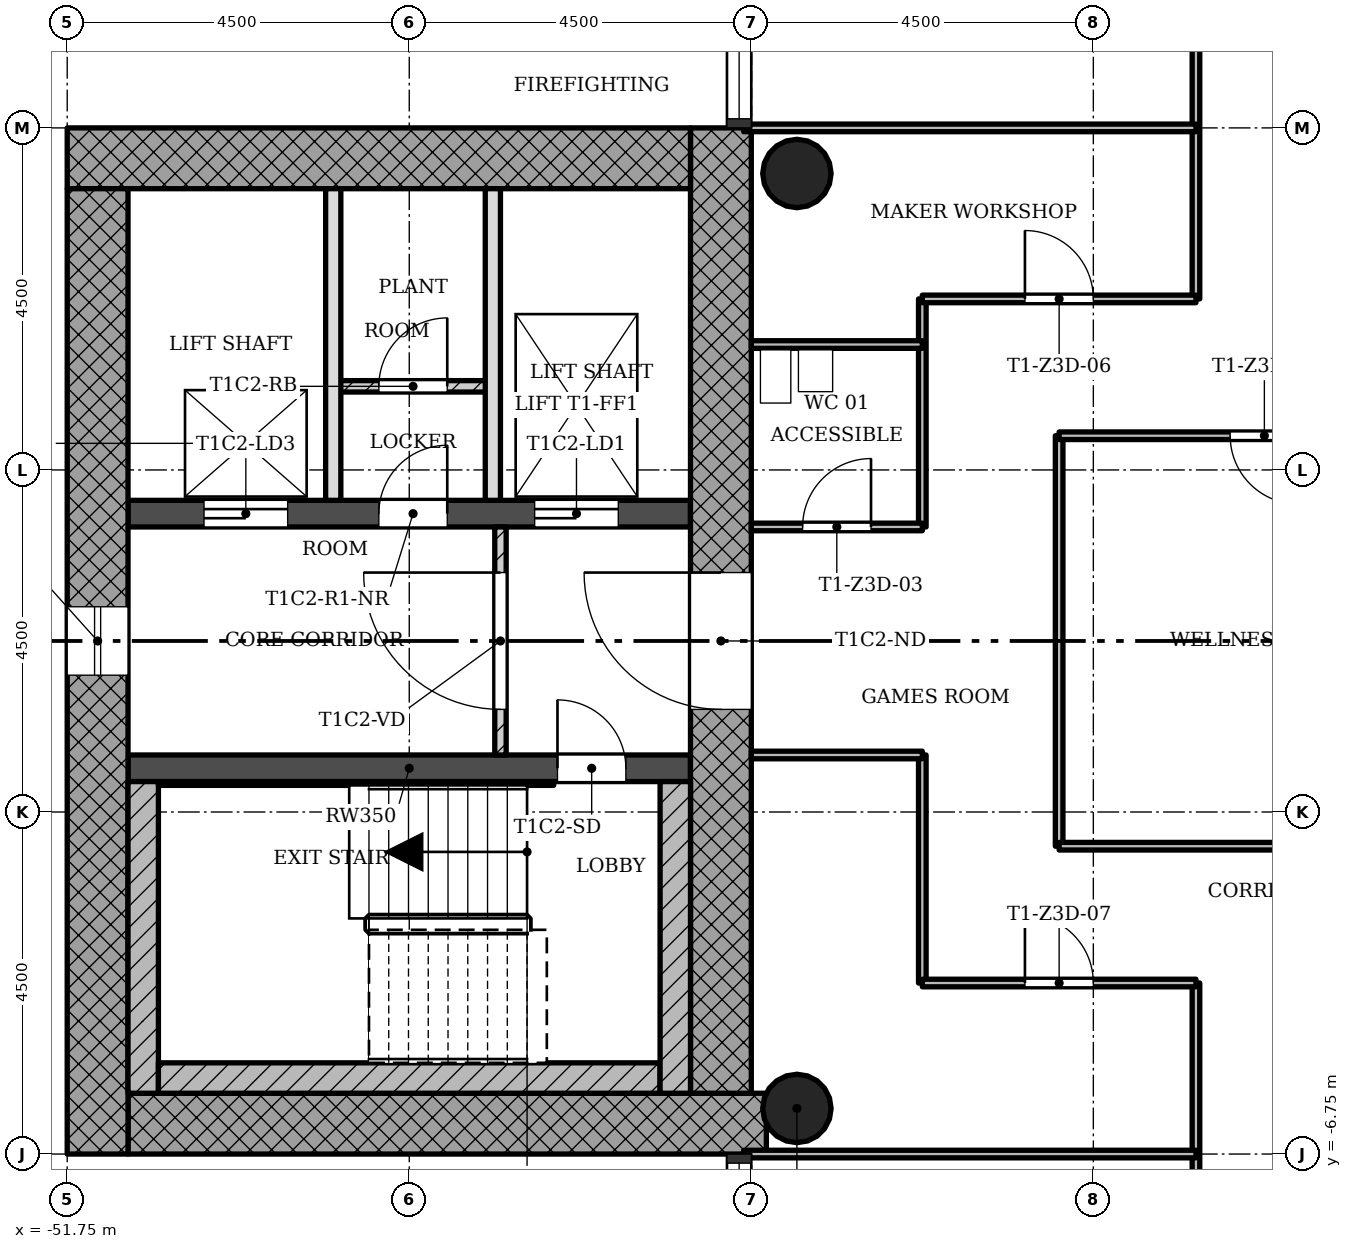
"""IFC4 building model, lengths in metres.
Left out: names, types, materials, properties, quantities, classifications, styles, units other than length and angle.
Written with IfcOpenShell. Run it as: python <this file> out.ifc"""

import sys

from ifc_helpers import new_model, si_unit, direction, frame, frame_2d, origin, origin_2d, place, context, subcontext, project, spatial, rectangle, hollow_circle, extrude, element, fill, save


model = new_model("IFC4")
c1 = context("Model", 3, precision=1e-05, world=origin(), true_north=direction((0.0, 1.0)))
c2 = subcontext(c1, "Body", "Model", "MODEL_VIEW")
j1 = project(units=[si_unit("LENGTHUNIT", "METRE"), si_unit("PLANEANGLEUNIT", "RADIAN")], contexts=[c1])
p1 = place(None, origin())
s1 = spatial("IfcSite", under=j1, at=p1, CompositionType="ELEMENT")
p2 = place(p1, origin())
s2 = spatial("IfcBuilding", under=s1, at=p2, CompositionType="ELEMENT")
p3 = place(p2, frame((0.0, 0.0, 174.5)))
s3 = spatial("IfcBuildingStorey", under=s2, at=p3, CompositionType="ELEMENT", Elevation=174.5)
p4 = place(p3, frame((-50.95, -6.35, 0.0), z_axis=(0.0, 0.0, 1.0), x_axis=(1.0, 0.0, 0.0)))
e1 = element("IfcWall", 1, at=p4, inside=s3, PredefinedType="SHEAR", context=c2, shape_type="SweptSolid", body=[
    extrude(rectangle(XDim=8.398, YDim=0.8, at=frame_2d((4.199, 0.0))), origin(), (0.0, 0.0, 1.0), 3.4),
])
p5 = place(p3, frame((-43.15, -5.95, 0.0), z_axis=(0.0, 0.0, 1.0), x_axis=(0.0, 1.0, 0.0)))
e2 = element("IfcWall", 2, at=p5, inside=s3, PredefinedType="SHEAR", context=c2, shape_type="SweptSolid", body=[
    extrude(rectangle(XDim=12.7, YDim=0.8, at=frame_2d((6.35, 0.0))), origin(), (0.0, 0.0, 1.0), 3.4),
])
p6 = place(p5, frame((5.05, 0.0, 0.0)))
e3 = element("IfcOpeningElement", 3, at=p6, cuts=e2, PredefinedType="OPENING", context=c2, shape_type="SweptSolid", body=[
    extrude(rectangle(XDim=1.8, YDim=2.1, at=frame_2d((0.9, 1.05))), frame((0.0, 0.41, 0.0), z_axis=(0.0, -1.0, 0.0), x_axis=(1.0, 0.0, 0.0)), (0.0, 0.0, 1.0), 0.82),
])
p7 = place(p3, frame((-43.55, 6.35, 0.0), z_axis=(0.0, 0.0, 1.0), x_axis=(-1.0, 0.0, 0.0)))
e4 = element("IfcWall", 4, at=p7, inside=s3, PredefinedType="SHEAR", context=c2, shape_type="SweptSolid", body=[
    extrude(rectangle(XDim=8.2, YDim=0.8, at=frame_2d((4.1, 0.0))), origin(), (0.0, 0.0, 1.0), 3.4),
])
p8 = place(p3, frame((-51.35, 5.95, 0.0), z_axis=(0.0, 0.0, 1.0), x_axis=(0.0, -1.0, 0.0)))
e5 = element("IfcWall", 5, at=p8, inside=s3, PredefinedType="SHEAR", context=c2, shape_type="SweptSolid", body=[
    extrude(rectangle(XDim=12.7, YDim=0.8, at=frame_2d((6.35, 0.0))), origin(), (0.0, 0.0, 1.0), 3.4),
])
p9 = place(p8, frame((5.5, 0.0, 0.45)))
e6 = element("IfcOpeningElement", 6, at=p9, cuts=e5, PredefinedType="OPENING", context=c2, shape_type="SweptSolid", body=[
    extrude(rectangle(XDim=0.9, YDim=2.4, at=frame_2d((0.45, 1.2))), frame((0.0, 0.41, 0.0), z_axis=(0.0, -1.0, 0.0), x_axis=(1.0, 0.0, 0.0)), (0.0, 0.0, 1.0), 0.82),
])
p10 = place(p3, frame((-50.95, -1.675, 0.0), z_axis=(0.0, 0.0, 1.0), x_axis=(1.0, 0.0, 0.0)))
e7 = element("IfcWall", 7, at=p10, inside=s3, PredefinedType="SHEAR", context=c2, shape_type="SweptSolid", body=[
    extrude(rectangle(XDim=7.4, YDim=0.35, at=frame_2d((3.7, 0.0))), origin(), (0.0, 0.0, 1.0), 3.4),
])
p11 = place(p10, frame((5.65, 0.0, 0.0)))
e8 = element("IfcOpeningElement", 8, at=p11, cuts=e7, PredefinedType="OPENING", context=c2, shape_type="SweptSolid", body=[
    extrude(rectangle(XDim=0.9, YDim=2.1, at=frame_2d((0.45, 1.05))), frame((0.0, 0.185, 0.0), z_axis=(0.0, -1.0, 0.0), x_axis=(1.0, 0.0, 0.0)), (0.0, 0.0, 1.0), 0.37),
])
p12 = place(p3, frame((-50.95, 1.675, 0.0), z_axis=(0.0, 0.0, 1.0), x_axis=(1.0, 0.0, 0.0)))
e9 = element("IfcWall", 9, at=p12, inside=s3, PredefinedType="SHEAR", context=c2, shape_type="SweptSolid", body=[
    extrude(rectangle(XDim=7.4, YDim=0.35, at=frame_2d((3.7, 0.0))), origin(), (0.0, 0.0, 1.0), 3.4),
])
p13 = place(p12, frame((5.35, 0.0, 0.0)))
e10 = element("IfcOpeningElement", 10, at=p13, cuts=e9, PredefinedType="OPENING", context=c2, shape_type="SweptSolid", body=[
    extrude(rectangle(XDim=1.1, YDim=2.1, at=frame_2d((0.55, 1.05))), frame((0.0, 0.185, 0.0), z_axis=(0.0, -1.0, 0.0), x_axis=(1.0, 0.0, 0.0)), (0.0, 0.0, 1.0), 0.37),
])
p14 = place(p12, frame((1.0, 0.0, 0.0)))
e11 = element("IfcOpeningElement", 11, at=p14, cuts=e9, PredefinedType="OPENING", context=c2, shape_type="SweptSolid", body=[
    extrude(rectangle(XDim=1.1, YDim=2.1, at=frame_2d((0.55, 1.05))), frame((0.0, 0.185, 0.0), z_axis=(0.0, -1.0, 0.0), x_axis=(1.0, 0.0, 0.0)), (0.0, 0.0, 1.0), 0.37),
])
p15 = place(p12, frame((3.3, 0.0, 0.0)))
e12 = element("IfcOpeningElement", 12, at=p15, cuts=e9, PredefinedType="OPENING", context=c2, shape_type="SweptSolid", body=[
    extrude(rectangle(XDim=0.9, YDim=2.1, at=frame_2d((0.45, 1.05))), frame((0.0, 0.185, 0.0), z_axis=(0.0, -1.0, 0.0), x_axis=(1.0, 0.0, 0.0)), (0.0, 0.0, 1.0), 0.37),
])
for number, where, z_axis, x_axis in (
    (13, (-42.15, -6.15, 0.0), (0.0, 0.0, 1.0), (1.0, 0.0, 0.0)),
    (14, (-42.15, 6.15, 0.0), (0.0, 0.0, 1.0), (1.0, 0.0, 0.0)),
):
    element("IfcColumn", number, at=place(p3, frame(where, z_axis=z_axis, x_axis=x_axis)), inside=s3, PredefinedType="COLUMN", context=c2, shape_type="SweptSolid", body=[
        extrude(hollow_circle(Radius=0.45, WallThickness=0.032, at=origin_2d()), origin(), (0.0, 0.0, 1.0), 3.4),
    ])
p16 = place(p3, frame((-46.05, 1.5, 0.0), z_axis=(0.0, 0.0, 1.0), x_axis=(0.0, -1.0, 0.0)))
e15 = element("IfcWall", 15, at=p16, inside=s3, PredefinedType="PARTITIONING", context=c2, shape_type="SweptSolid", body=[
    extrude(rectangle(XDim=3.0, YDim=0.15, at=frame_2d((1.5, 0.0))), origin(), (0.0, 0.0, 1.0), 3.0),
])
p17 = place(p16, frame((0.6, 0.0, 0.0)))
e16 = element("IfcOpeningElement", 16, at=p17, cuts=e15, PredefinedType="OPENING", context=c2, shape_type="SweptSolid", body=[
    extrude(rectangle(XDim=1.8, YDim=2.1, at=frame_2d((0.9, 1.05))), frame((0.0, 0.085, 0.0), z_axis=(0.0, -1.0, 0.0), x_axis=(1.0, 0.0, 0.0)), (0.0, 0.0, 1.0), 0.17),
])
for number, where, z_axis, x_axis in (
    (17, (-48.25, 5.95, 0.0), (0.0, 0.0, 1.0), (0.0, -1.0, 0.0)),
    (18, (-46.15, 5.95, 0.0), (0.0, 0.0, 1.0), (0.0, -1.0, 0.0)),
):
    element("IfcWall", number, at=place(p3, frame(where, z_axis=z_axis, x_axis=x_axis)), inside=s3, PredefinedType="SOLIDWALL", context=c2, shape_type="SweptSolid", body=[
        extrude(rectangle(XDim=4.1, YDim=0.2, at=frame_2d((2.05, 0.0))), origin(), (0.0, 0.0, 1.0), 3.0),
    ])
p18 = place(p3, frame((-46.15, 3.35, 0.0), z_axis=(0.0, 0.0, 1.0), x_axis=(-1.0, 0.0, 0.0)))
e19 = element("IfcWall", 19, at=p18, inside=s3, PredefinedType="PARTITIONING", context=c2, shape_type="SweptSolid", body=[
    extrude(rectangle(XDim=2.1, YDim=0.15, at=frame_2d((1.05, 0.0))), origin(), (0.0, 0.0, 1.0), 3.0),
])
p19 = place(p18, frame((0.6, 0.0, 0.0)))
e20 = element("IfcOpeningElement", 20, at=p19, cuts=e19, PredefinedType="OPENING", context=c2, shape_type="SweptSolid", body=[
    extrude(rectangle(XDim=0.9, YDim=2.1, at=frame_2d((0.45, 1.05))), frame((0.0, 0.085, 0.0), z_axis=(0.0, -1.0, 0.0), x_axis=(1.0, 0.0, 0.0)), (0.0, 0.0, 1.0), 0.17),
])
for number, where, z_axis, x_axis in (
    (21, (-40.5, -4.5, 0.0), (0.0, 0.0, 1.0), (0.0, 1.0, 0.0)),
    (22, (-40.5, 1.5, 0.0), (0.0, 0.0, 1.0), (0.0, 1.0, 0.0)),
):
    element("IfcWall", number, at=place(p3, frame(where, z_axis=z_axis, x_axis=x_axis)), inside=s3, PredefinedType="PARTITIONING", context=c2, shape_type="SweptSolid", body=[
        extrude(rectangle(XDim=3.0, YDim=0.1, at=frame_2d((1.5, 0.0))), origin(), (0.0, 0.0, 1.0), 3.0),
    ])
p20 = place(p3, frame((-38.7, -2.7, 0.0), z_axis=(0.0, 0.0, 1.0), x_axis=(0.0, 1.0, 0.0)))
e23 = element("IfcWall", 23, at=p20, inside=s3, PredefinedType="PARTITIONING", context=c2, shape_type="SweptSolid", body=[
    extrude(rectangle(XDim=5.4, YDim=0.1, at=frame_2d((2.7, 0.0))), origin(), (0.0, 0.0, 1.0), 3.0),
])
for number, where, z_axis, x_axis in (
    (24, (-36.9, -8.55, 0.0), (0.0, 0.0, 1.0), (0.0, 1.0, 0.0)),
    (25, (-36.9, 4.5, 0.0), (0.0, 0.0, 1.0), (0.0, 1.0, 0.0)),
):
    element("IfcWall", number, at=place(p3, frame(where, z_axis=z_axis, x_axis=x_axis)), inside=s3, PredefinedType="PARTITIONING", context=c2, shape_type="SweptSolid", body=[
        extrude(rectangle(XDim=4.05, YDim=0.1, at=frame_2d((2.025, 0.0))), origin(), (0.0, 0.0, 1.0), 3.0),
    ])
p21 = place(p3, frame((-42.85, -6.75, 0.0), z_axis=(0.0, 0.0, 1.0), x_axis=(1.0, 0.0, 0.0)))
e26 = element("IfcWall", 26, at=p21, inside=s3, PredefinedType="PARTITIONING", context=c2, shape_type="SweptSolid", body=[
    extrude(rectangle(XDim=5.95, YDim=0.1, at=frame_2d((2.975, 0.0))), origin(), (0.0, 0.0, 1.0), 3.0),
])
p22 = place(p3, frame((-40.5, -4.5, 0.0), z_axis=(0.0, 0.0, 1.0), x_axis=(1.0, 0.0, 0.0)))
e27 = element("IfcWall", 27, at=p22, inside=s3, PredefinedType="PARTITIONING", context=c2, shape_type="SweptSolid", body=[
    extrude(rectangle(XDim=3.6, YDim=0.1, at=frame_2d((1.8, 0.0))), origin(), (0.0, 0.0, 1.0), 3.0),
])
p23 = place(p22, frame((1.35, 0.0, 0.0)))
e28 = element("IfcOpeningElement", 28, at=p23, cuts=e27, PredefinedType="OPENING", context=c2, shape_type="SweptSolid", body=[
    extrude(rectangle(XDim=0.9, YDim=2.1, at=frame_2d((0.45, 1.05))), frame((0.0, 0.06, 0.0), z_axis=(0.0, -1.0, 0.0), x_axis=(1.0, 0.0, 0.0)), (0.0, 0.0, 1.0), 0.12),
])
p24 = place(p3, frame((-38.7, -2.7, 0.0), z_axis=(0.0, 0.0, 1.0), x_axis=(1.0, 0.0, 0.0)))
e29 = element("IfcWall", 29, at=p24, inside=s3, PredefinedType="PARTITIONING", context=c2, shape_type="SweptSolid", body=[
    extrude(rectangle(XDim=5.4, YDim=0.1, at=frame_2d((2.7, 0.0))), origin(), (0.0, 0.0, 1.0), 3.0),
])
p25 = place(p3, frame((-42.75, -1.5, 0.0), z_axis=(0.0, 0.0, 1.0), x_axis=(1.0, 0.0, 0.0)))
e30 = element("IfcWall", 30, at=p25, inside=s3, PredefinedType="PARTITIONING", context=c2, shape_type="SweptSolid", body=[
    extrude(rectangle(XDim=2.25, YDim=0.1, at=frame_2d((1.125, 0.0))), origin(), (0.0, 0.0, 1.0), 3.0),
])
p26 = place(p3, frame((-42.75, 1.5, 0.0), z_axis=(0.0, 0.0, 1.0), x_axis=(1.0, 0.0, 0.0)))
e31 = element("IfcWall", 31, at=p26, inside=s3, PredefinedType="PARTITIONING", context=c2, shape_type="SweptSolid", body=[
    extrude(rectangle(XDim=2.25, YDim=0.1, at=frame_2d((1.125, 0.0))), origin(), (0.0, 0.0, 1.0), 3.0),
])
p27 = place(p26, frame((0.675, 0.0, 0.0)))
e32 = element("IfcOpeningElement", 32, at=p27, cuts=e31, PredefinedType="OPENING", context=c2, shape_type="SweptSolid", body=[
    extrude(rectangle(XDim=0.9, YDim=2.1, at=frame_2d((0.45, 1.05))), frame((0.0, 0.06, 0.0), z_axis=(0.0, -1.0, 0.0), x_axis=(1.0, 0.0, 0.0)), (0.0, 0.0, 1.0), 0.12),
])
p28 = place(p3, frame((-38.7, 2.7, 0.0), z_axis=(0.0, 0.0, 1.0), x_axis=(1.0, 0.0, 0.0)))
e33 = element("IfcWall", 33, at=p28, inside=s3, PredefinedType="PARTITIONING", context=c2, shape_type="SweptSolid", body=[
    extrude(rectangle(XDim=5.4, YDim=0.1, at=frame_2d((2.7, 0.0))), origin(), (0.0, 0.0, 1.0), 3.0),
])
p29 = place(p28, frame((2.25, 0.0, 0.0)))
e34 = element("IfcOpeningElement", 34, at=p29, cuts=e33, PredefinedType="OPENING", context=c2, shape_type="SweptSolid", body=[
    extrude(rectangle(XDim=0.9, YDim=2.1, at=frame_2d((0.45, 1.05))), frame((0.0, 0.06, 0.0), z_axis=(0.0, -1.0, 0.0), x_axis=(1.0, 0.0, 0.0)), (0.0, 0.0, 1.0), 0.12),
])
p30 = place(p3, frame((-42.75, 3.9, 0.0), z_axis=(0.0, 0.0, 1.0), x_axis=(1.0, 0.0, 0.0)))
e35 = element("IfcWall", 35, at=p30, inside=s3, PredefinedType="PARTITIONING", context=c2, shape_type="SweptSolid", body=[
    extrude(rectangle(XDim=2.25, YDim=0.1, at=frame_2d((1.125, 0.0))), origin(), (0.0, 0.0, 1.0), 3.0),
])
p31 = place(p3, frame((-40.5, 4.5, 0.0), z_axis=(0.0, 0.0, 1.0), x_axis=(1.0, 0.0, 0.0)))
e36 = element("IfcWall", 36, at=p31, inside=s3, PredefinedType="PARTITIONING", context=c2, shape_type="SweptSolid", body=[
    extrude(rectangle(XDim=3.6, YDim=0.1, at=frame_2d((1.8, 0.0))), origin(), (0.0, 0.0, 1.0), 3.0),
])
p32 = place(p31, frame((1.35, 0.0, 0.0)))
e37 = element("IfcOpeningElement", 37, at=p32, cuts=e36, PredefinedType="OPENING", context=c2, shape_type="SweptSolid", body=[
    extrude(rectangle(XDim=0.9, YDim=2.1, at=frame_2d((0.45, 1.05))), frame((0.0, 0.06, 0.0), z_axis=(0.0, -1.0, 0.0), x_axis=(1.0, 0.0, 0.0)), (0.0, 0.0, 1.0), 0.12),
])
p33 = place(p3, frame((-42.85, 6.75, 0.0), z_axis=(0.0, 0.0, 1.0), x_axis=(1.0, 0.0, 0.0)))
e38 = element("IfcWall", 38, at=p33, inside=s3, PredefinedType="PARTITIONING", context=c2, shape_type="SweptSolid", body=[
    extrude(rectangle(XDim=5.95, YDim=0.1, at=frame_2d((2.975, 0.0))), origin(), (0.0, 0.0, 1.0), 3.0),
])
p34 = place(p3, frame((-50.75, -1.85, 0.0), z_axis=(0.0, 0.0, 1.0), x_axis=(0.0, -1.0, 0.0)))
e39 = element("IfcWall", 39, at=p34, inside=s3, PredefinedType="SHEAR", context=c2, shape_type="SweptSolid", body=[
    extrude(rectangle(XDim=4.1, YDim=0.4, at=frame_2d((2.05, 0.0))), origin(), (0.0, 0.0, 1.0), 3.4),
])
p35 = place(p3, frame((-43.95, -5.75, 0.0), z_axis=(0.0, 0.0, 1.0), x_axis=(-1.0, 0.0, 0.0)))
e40 = element("IfcWall", 40, at=p35, inside=s3, PredefinedType="SHEAR", context=c2, shape_type="SweptSolid", body=[
    extrude(rectangle(XDim=6.6, YDim=0.4, at=frame_2d((3.3, 0.0))), origin(), (0.0, 0.0, 1.0), 3.4),
])
p36 = place(p3, frame((-43.75, -1.85, 0.0), z_axis=(0.0, 0.0, 1.0), x_axis=(0.0, -1.0, 0.0)))
e41 = element("IfcWall", 41, at=p36, inside=s3, PredefinedType="SHEAR", context=c2, shape_type="SweptSolid", body=[
    extrude(rectangle(XDim=4.1, YDim=0.4, at=frame_2d((2.05, 0.0))), origin(), (0.0, 0.0, 1.0), 3.4),
])
p37 = place(p3, frame((-45.35, -1.875, 0.0), z_axis=(0.0, 0.0, 1.0), x_axis=(-1.0, 0.0, 0.0)))
e42 = element("IfcWall", 42, at=p37, inside=s3, PredefinedType="SHEAR", context=c2, shape_type="SweptSolid", body=[
    extrude(rectangle(XDim=5.2, YDim=0.05, at=frame_2d((2.6, 0.0))), origin(), (0.0, 0.0, 1.0), 3.4),
])
p38 = place(p9, origin())
e43 = element("IfcWindow", 43, at=p38, inside=s3, PartitioningType="SINGLE_PANEL", PredefinedType="WINDOW", context=c2, shape_type="SweptSolid", body=[
    extrude(rectangle(XDim=0.9, YDim=2.4, at=frame_2d((0.45, 1.2))), frame((0.0, 0.03, 0.0), z_axis=(0.0, -1.0, 0.0), x_axis=(1.0, 0.0, 0.0)), (0.0, 0.0, 1.0), 0.06),
])
fill(e6, e43)
p39 = place(p17, origin())
e44 = element("IfcDoor", 44, at=p39, inside=s3, OperationType="SINGLE_SWING_LEFT", PredefinedType="DOOR", context=c2, shape_type="SweptSolid", body=[
    extrude(rectangle(XDim=1.8, YDim=2.1, at=frame_2d((0.9, 1.05))), frame((0.0, 0.025, 0.0), z_axis=(0.0, -1.0, 0.0), x_axis=(1.0, 0.0, 0.0)), (0.0, 0.0, 1.0), 0.05),
])
fill(e16, e44)
p40 = place(p19, origin())
e45 = element("IfcDoor", 45, at=p40, inside=s3, OperationType="SINGLE_SWING_LEFT", PredefinedType="DOOR", context=c2, shape_type="SweptSolid", body=[
    extrude(rectangle(XDim=0.9, YDim=2.1, at=frame_2d((0.45, 1.05))), frame((0.0, 0.025, 0.0), z_axis=(0.0, -1.0, 0.0), x_axis=(1.0, 0.0, 0.0)), (0.0, 0.0, 1.0), 0.05),
])
fill(e20, e45)
p41 = place(p29, origin())
e46 = element("IfcDoor", 46, at=p41, inside=s3, OperationType="SINGLE_SWING_RIGHT", PredefinedType="DOOR", context=c2, shape_type="SweptSolid", body=[
    extrude(rectangle(XDim=0.9, YDim=2.1, at=frame_2d((0.45, 1.05))), frame((0.0, 0.025, 0.0), z_axis=(0.0, -1.0, 0.0), x_axis=(1.0, 0.0, 0.0)), (0.0, 0.0, 1.0), 0.05),
])
fill(e34, e46)
p42 = place(p27, origin())
e47 = element("IfcDoor", 47, at=p42, inside=s3, OperationType="SINGLE_SWING_LEFT", PredefinedType="DOOR", context=c2, shape_type="SweptSolid", body=[
    extrude(rectangle(XDim=0.9, YDim=2.1, at=frame_2d((0.45, 1.05))), frame((0.0, 0.025, 0.0), z_axis=(0.0, -1.0, 0.0), x_axis=(1.0, 0.0, 0.0)), (0.0, 0.0, 1.0), 0.05),
])
fill(e32, e47)
p43 = place(p32, origin())
e48 = element("IfcDoor", 48, at=p43, inside=s3, OperationType="SINGLE_SWING_RIGHT", PredefinedType="DOOR", context=c2, shape_type="SweptSolid", body=[
    extrude(rectangle(XDim=0.9, YDim=2.1, at=frame_2d((0.45, 1.05))), frame((0.0, 0.025, 0.0), z_axis=(0.0, -1.0, 0.0), x_axis=(1.0, 0.0, 0.0)), (0.0, 0.0, 1.0), 0.05),
])
fill(e37, e48)
p44 = place(p23, origin())
e49 = element("IfcDoor", 49, at=p44, inside=s3, OperationType="SINGLE_SWING_RIGHT", PredefinedType="DOOR", context=c2, shape_type="SweptSolid", body=[
    extrude(rectangle(XDim=0.9, YDim=2.1, at=frame_2d((0.45, 1.05))), frame((0.0, 0.025, 0.0), z_axis=(0.0, -1.0, 0.0), x_axis=(1.0, 0.0, 0.0)), (0.0, 0.0, 1.0), 0.05),
])
fill(e28, e49)
p45 = place(p11, origin())
e50 = element("IfcDoor", 50, at=p45, inside=s3, OperationType="SINGLE_SWING_RIGHT", PredefinedType="DOOR", context=c2, shape_type="SweptSolid", body=[
    extrude(rectangle(XDim=0.9, YDim=2.1, at=frame_2d((0.45, 1.05))), frame((0.0, 0.025, 0.0), z_axis=(0.0, -1.0, 0.0), x_axis=(1.0, 0.0, 0.0)), (0.0, 0.0, 1.0), 0.05),
])
fill(e8, e50)
p46 = place(p13, origin())
e51 = element("IfcDoor", 51, at=p46, inside=s3, OperationType="SLIDING_TO_LEFT", PredefinedType="DOOR", context=c2, shape_type="SweptSolid", body=[
    extrude(rectangle(XDim=1.1, YDim=2.1, at=frame_2d((0.55, 1.05))), frame((0.0, 0.025, 0.0), z_axis=(0.0, -1.0, 0.0), x_axis=(1.0, 0.0, 0.0)), (0.0, 0.0, 1.0), 0.05),
])
fill(e10, e51)
p47 = place(p14, origin())
e52 = element("IfcDoor", 52, at=p47, inside=s3, OperationType="SLIDING_TO_LEFT", PredefinedType="DOOR", context=c2, shape_type="SweptSolid", body=[
    extrude(rectangle(XDim=1.1, YDim=2.1, at=frame_2d((0.55, 1.05))), frame((0.0, 0.025, 0.0), z_axis=(0.0, -1.0, 0.0), x_axis=(1.0, 0.0, 0.0)), (0.0, 0.0, 1.0), 0.05),
])
fill(e11, e52)
p48 = place(p15, origin())
e53 = element("IfcDoor", 53, at=p48, inside=s3, OperationType="SINGLE_SWING_LEFT", PredefinedType="DOOR", context=c2, shape_type="SweptSolid", body=[
    extrude(rectangle(XDim=0.9, YDim=2.1, at=frame_2d((0.45, 1.05))), frame((0.0, 0.025, 0.0), z_axis=(0.0, -1.0, 0.0), x_axis=(1.0, 0.0, 0.0)), (0.0, 0.0, 1.0), 0.05),
])
fill(e12, e53)
p49 = place(p6, origin())
e54 = element("IfcDoor", 54, at=p49, inside=s3, OperationType="SINGLE_SWING_LEFT", PredefinedType="DOOR", context=c2, shape_type="SweptSolid", body=[
    extrude(rectangle(XDim=1.8, YDim=2.1, at=frame_2d((0.9, 1.05))), frame((0.0, 0.025, 0.0), z_axis=(0.0, -1.0, 0.0), x_axis=(1.0, 0.0, 0.0)), (0.0, 0.0, 1.0), 0.05),
])
fill(e3, e54)
save(model, sys.argv[1])
